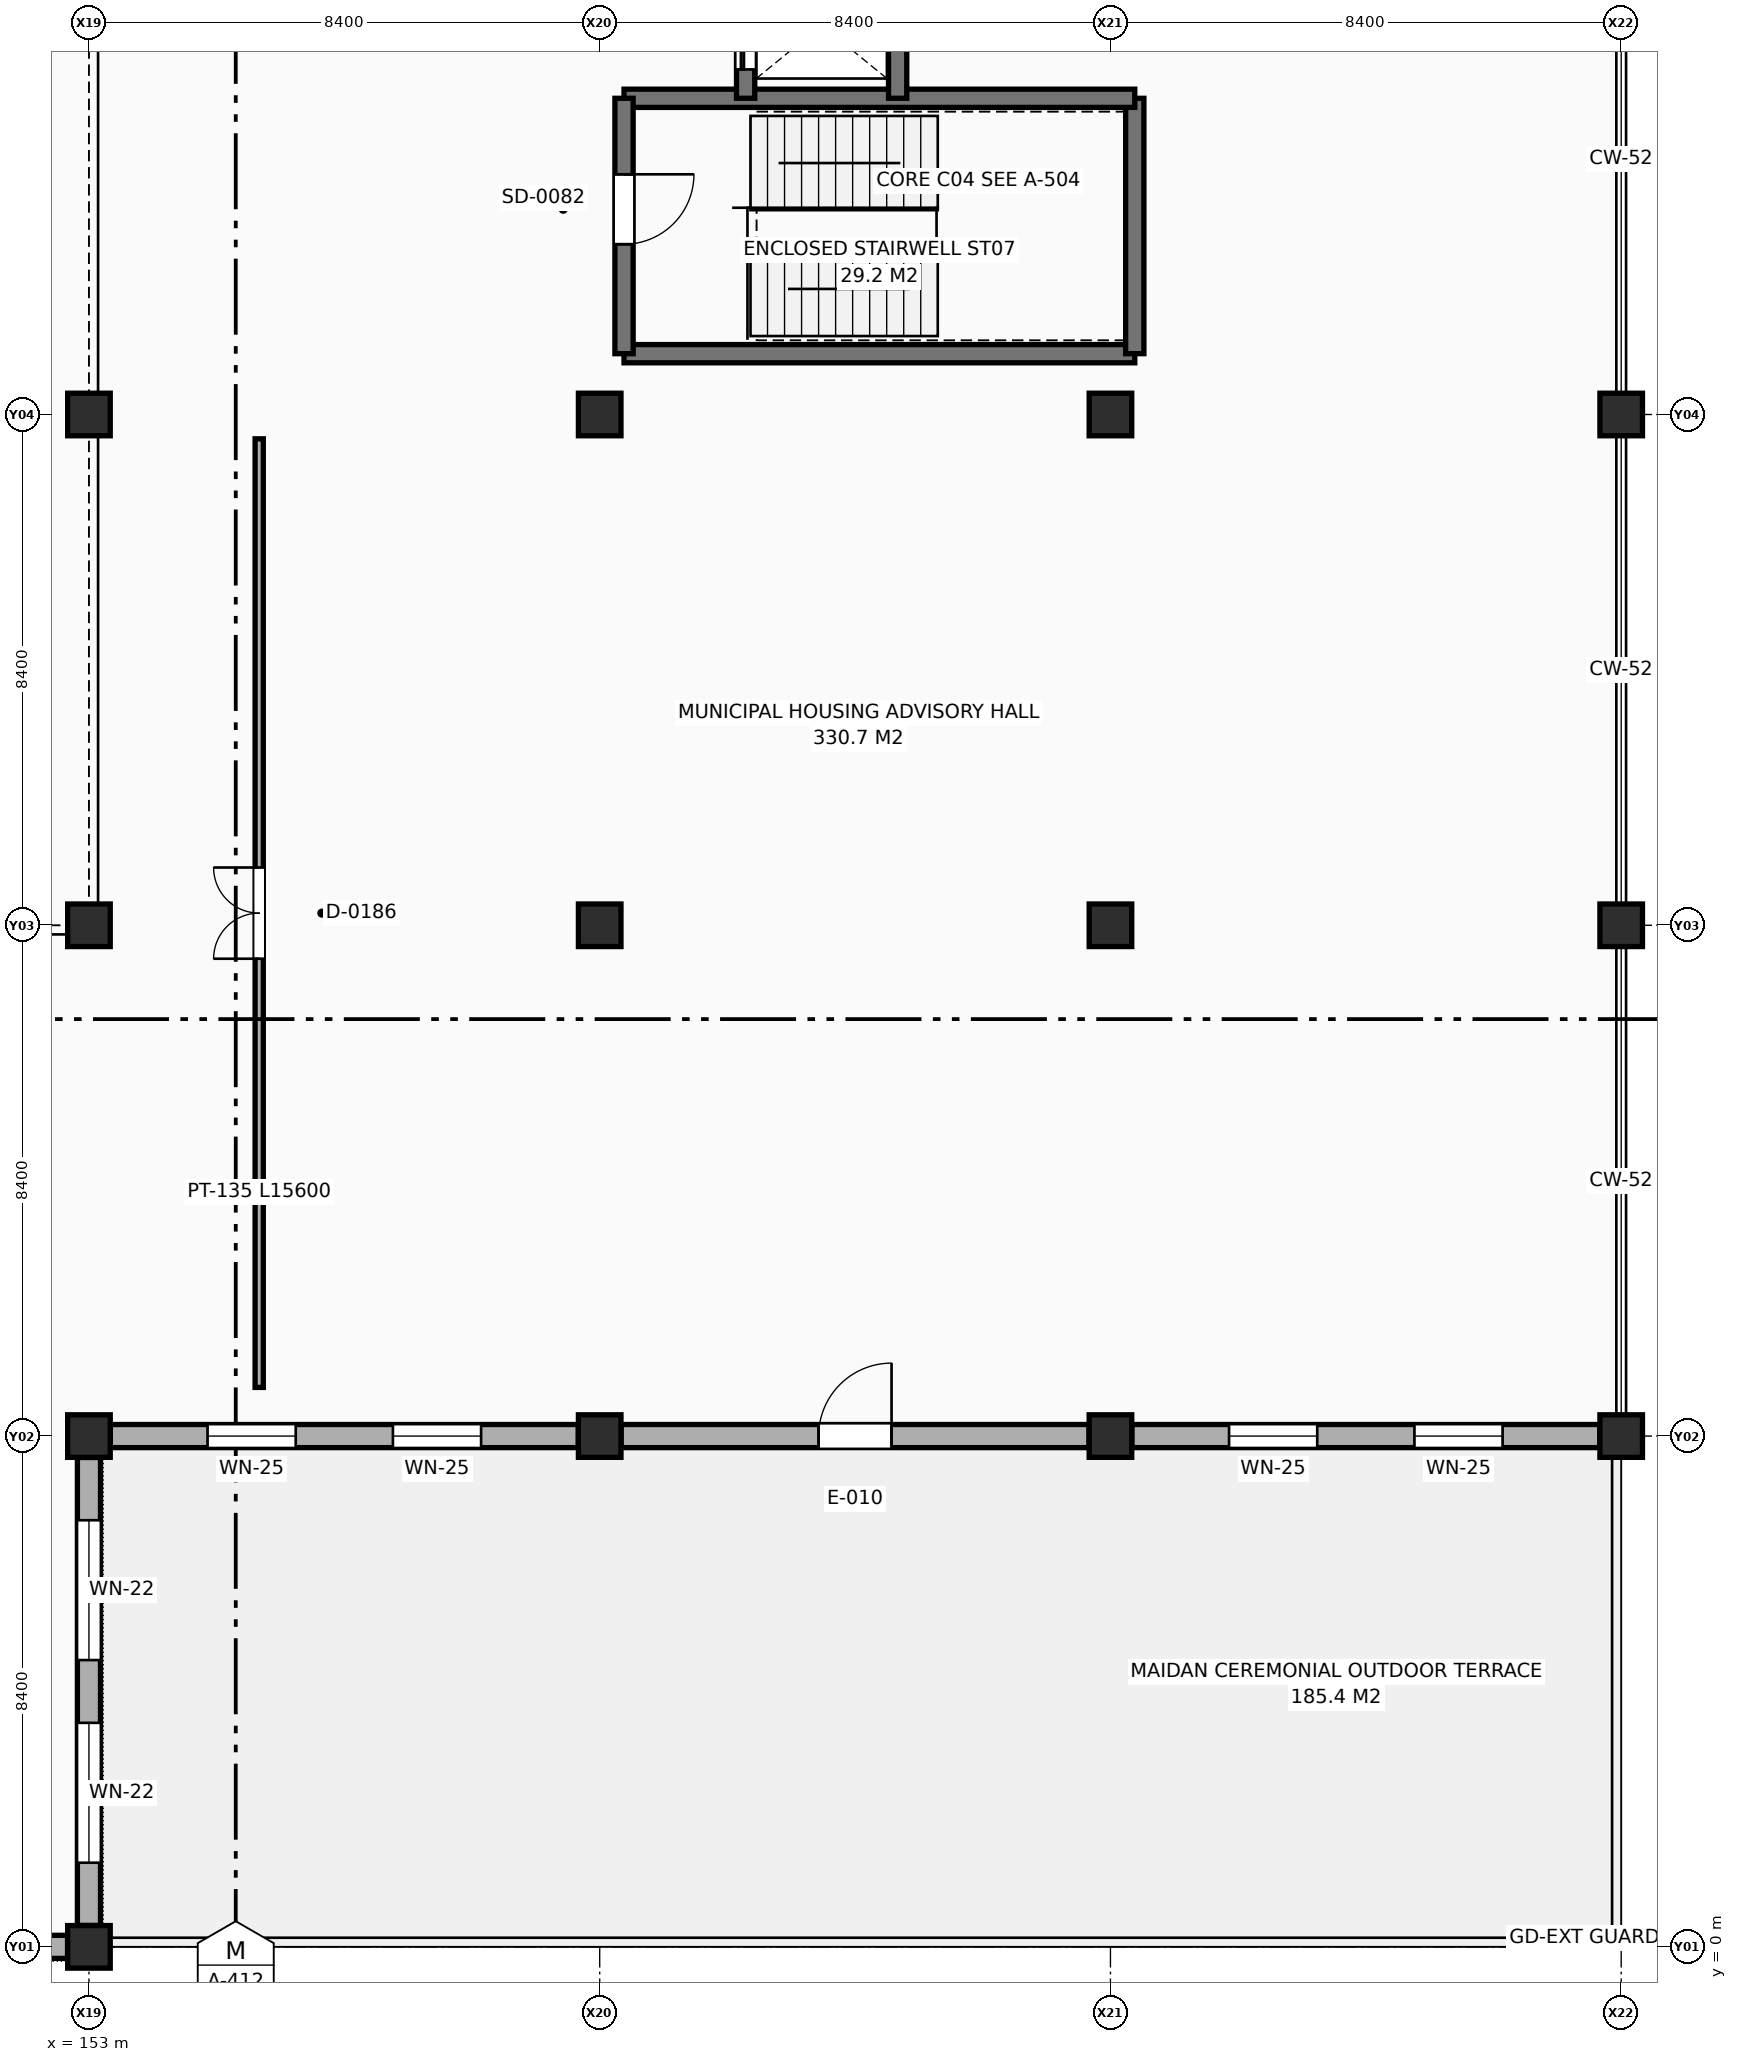
"""IFC4 building model, lengths in metres.
Left out: names, types, materials, properties, quantities, classifications, styles, units other than length and angle.
Written with IfcOpenShell. Run it as: python <this file> out.ifc"""

import sys

from ifc_helpers import new_model, si_unit, direction, frame, frame_2d, origin, origin_2d, place, context, subcontext, project, spatial, rectangle, extrude, element, fill, save


model = new_model("IFC4")
c1 = context("Model", 3, precision=1e-05, world=origin(), true_north=direction((0.0, 1.0)))
c2 = subcontext(c1, "Body", "Model", "MODEL_VIEW")
j1 = project(units=[si_unit("LENGTHUNIT", "METRE"), si_unit("PLANEANGLEUNIT", "RADIAN")], contexts=[c1])
p1 = place(None, origin())
s1 = spatial("IfcSite", under=j1, at=p1, CompositionType="ELEMENT")
p2 = place(p1, origin())
s2 = spatial("IfcBuilding", under=s1, at=p2, CompositionType="ELEMENT")
p3 = place(p2, frame((0.0, 0.0, 5.4)))
s3 = spatial("IfcBuildingStorey", under=s2, at=p3, CompositionType="ELEMENT", Elevation=5.4)
for number, where, z_axis, x_axis in (
    (1, (153.0, 0.0, 0.0), (0.0, 0.0, 1.0), (1.0, 0.0, 0.0)),
    (2, (153.0, 8.4, 0.0), (0.0, 0.0, 1.0), (1.0, 0.0, 0.0)),
    (3, (153.0, 16.8, 0.0), (0.0, 0.0, 1.0), (1.0, 0.0, 0.0)),
    (4, (153.0, 25.2, 0.0), (0.0, 0.0, 1.0), (1.0, 0.0, 0.0)),
    (5, (161.4, 8.4, 0.0), (0.0, 0.0, 1.0), (1.0, 0.0, 0.0)),
    (6, (161.4, 16.8, 0.0), (0.0, 0.0, 1.0), (1.0, 0.0, 0.0)),
    (7, (161.4, 25.2, 0.0), (0.0, 0.0, 1.0), (1.0, 0.0, 0.0)),
    (8, (169.8, 8.4, 0.0), (0.0, 0.0, 1.0), (1.0, 0.0, 0.0)),
    (9, (169.8, 16.8, 0.0), (0.0, 0.0, 1.0), (1.0, 0.0, 0.0)),
    (10, (169.8, 25.2, 0.0), (0.0, 0.0, 1.0), (1.0, 0.0, 0.0)),
    (11, (178.2, 8.4, 0.0), (0.0, 0.0, 1.0), (1.0, 0.0, 0.0)),
    (12, (178.2, 16.8, 0.0), (0.0, 0.0, 1.0), (1.0, 0.0, 0.0)),
    (13, (178.2, 25.2, 0.0), (0.0, 0.0, 1.0), (1.0, 0.0, 0.0)),
):
    element("IfcColumn", number, at=place(p3, frame(where, z_axis=z_axis, x_axis=x_axis)), inside=s3, PredefinedType="COLUMN", context=c2, shape_type="SweptSolid", body=[
        extrude(rectangle(XDim=0.7, YDim=0.7, at=origin_2d()), origin(), (0.0, 0.0, 1.0), 4.2),
    ])
p4 = place(p3, frame((144.952, 0.0, 0.0), z_axis=(0.0, 0.0, 1.0), x_axis=(1.0, 0.0, 0.0)))
e14 = element("IfcWall", 14, at=p4, inside=s3, PredefinedType="SOLIDWALL", context=c2, shape_type="SweptSolid", body=[
    extrude(rectangle(XDim=7.696, YDim=0.38, at=frame_2d((3.848, 0.0))), origin(), (0.0, 0.0, 1.0), 3.25),
])
p5 = place(p4, frame((1.232, 0.0, 0.9)))
e15 = element("IfcOpeningElement", 15, at=p5, cuts=e14, PredefinedType="OPENING", context=c2, shape_type="SweptSolid", body=[
    extrude(rectangle(XDim=2.0, YDim=1.8, at=frame_2d((1.0, 0.9))), frame((0.0, 0.2, 0.0), z_axis=(0.0, -1.0, 0.0), x_axis=(1.0, 0.0, 0.0)), (0.0, 0.0, 1.0), 0.4),
])
p6 = place(p4, frame((4.464, 0.0, 0.9)))
e16 = element("IfcOpeningElement", 16, at=p6, cuts=e14, PredefinedType="OPENING", context=c2, shape_type="SweptSolid", body=[
    extrude(rectangle(XDim=2.0, YDim=1.8, at=frame_2d((1.0, 0.9))), frame((0.0, 0.2, 0.0), z_axis=(0.0, -1.0, 0.0), x_axis=(1.0, 0.0, 0.0)), (0.0, 0.0, 1.0), 0.4),
])
p7 = place(p3, frame((153.0, 0.352, 0.0), z_axis=(0.0, 0.0, 1.0), x_axis=(0.0, 1.0, 0.0)))
e17 = element("IfcWall", 17, at=p7, inside=s3, PredefinedType="SOLIDWALL", context=c2, shape_type="SweptSolid", body=[
    extrude(rectangle(XDim=7.696, YDim=0.38, at=frame_2d((3.848, 0.0))), origin(), (0.0, 0.0, 1.0), 3.15),
])
p8 = place(p7, frame((1.032, 0.0, 0.9)))
e18 = element("IfcOpeningElement", 18, at=p8, cuts=e17, PredefinedType="OPENING", context=c2, shape_type="SweptSolid", body=[
    extrude(rectangle(XDim=2.3, YDim=1.8, at=frame_2d((1.15, 0.9))), frame((0.0, 0.2, 0.0), z_axis=(0.0, -1.0, 0.0), x_axis=(1.0, 0.0, 0.0)), (0.0, 0.0, 1.0), 0.4),
])
p9 = place(p7, frame((4.364, 0.0, 0.9)))
e19 = element("IfcOpeningElement", 19, at=p9, cuts=e17, PredefinedType="OPENING", context=c2, shape_type="SweptSolid", body=[
    extrude(rectangle(XDim=2.3, YDim=1.8, at=frame_2d((1.15, 0.9))), frame((0.0, 0.2, 0.0), z_axis=(0.0, -1.0, 0.0), x_axis=(1.0, 0.0, 0.0)), (0.0, 0.0, 1.0), 0.4),
])
p10 = place(p3, frame((153.352, 8.4, 0.0), z_axis=(0.0, 0.0, 1.0), x_axis=(1.0, 0.0, 0.0)))
e20 = element("IfcWall", 20, at=p10, inside=s3, PredefinedType="SOLIDWALL", context=c2, shape_type="SweptSolid", body=[
    extrude(rectangle(XDim=7.696, YDim=0.38, at=frame_2d((3.848, 0.0))), origin(), (0.0, 0.0, 1.0), 2.95),
])
p11 = place(p10, frame((1.599, 0.0, 0.9)))
e21 = element("IfcOpeningElement", 21, at=p11, cuts=e20, PredefinedType="OPENING", context=c2, shape_type="SweptSolid", body=[
    extrude(rectangle(XDim=1.45, YDim=1.5, at=frame_2d((0.725, 0.75))), frame((0.0, 0.2, 0.0), z_axis=(0.0, -1.0, 0.0), x_axis=(1.0, 0.0, 0.0)), (0.0, 0.0, 1.0), 0.4),
])
p12 = place(p10, frame((4.647, 0.0, 0.9)))
e22 = element("IfcOpeningElement", 22, at=p12, cuts=e20, PredefinedType="OPENING", context=c2, shape_type="SweptSolid", body=[
    extrude(rectangle(XDim=1.45, YDim=1.5, at=frame_2d((0.725, 0.75))), frame((0.0, 0.2, 0.0), z_axis=(0.0, -1.0, 0.0), x_axis=(1.0, 0.0, 0.0)), (0.0, 0.0, 1.0), 0.4),
])
p13 = place(p3, frame((161.752, 8.4, 0.0), z_axis=(0.0, 0.0, 1.0), x_axis=(1.0, 0.0, 0.0)))
e23 = element("IfcWall", 23, at=p13, inside=s3, PredefinedType="SOLIDWALL", context=c2, shape_type="SweptSolid", body=[
    extrude(rectangle(XDim=7.696, YDim=0.38, at=frame_2d((3.848, 0.0))), origin(), (0.0, 0.0, 1.0), 2.95),
])
p14 = place(p13, frame((3.248, 0.0, 0.0)))
e24 = element("IfcOpeningElement", 24, at=p14, cuts=e23, PredefinedType="OPENING", context=c2, shape_type="SweptSolid", body=[
    extrude(rectangle(XDim=1.2, YDim=2.2, at=frame_2d((0.6, 1.1))), frame((0.0, 0.2, 0.0), z_axis=(0.0, -1.0, 0.0), x_axis=(1.0, 0.0, 0.0)), (0.0, 0.0, 1.0), 0.4),
])
p15 = place(p3, frame((170.152, 8.4, 0.0), z_axis=(0.0, 0.0, 1.0), x_axis=(1.0, 0.0, 0.0)))
e25 = element("IfcWall", 25, at=p15, inside=s3, PredefinedType="SOLIDWALL", context=c2, shape_type="SweptSolid", body=[
    extrude(rectangle(XDim=7.696, YDim=0.38, at=frame_2d((3.848, 0.0))), origin(), (0.0, 0.0, 1.0), 2.95),
])
p16 = place(p15, frame((1.599, 0.0, 0.9)))
e26 = element("IfcOpeningElement", 26, at=p16, cuts=e25, PredefinedType="OPENING", context=c2, shape_type="SweptSolid", body=[
    extrude(rectangle(XDim=1.45, YDim=1.5, at=frame_2d((0.725, 0.75))), frame((0.0, 0.2, 0.0), z_axis=(0.0, -1.0, 0.0), x_axis=(1.0, 0.0, 0.0)), (0.0, 0.0, 1.0), 0.4),
])
p17 = place(p15, frame((4.647, 0.0, 0.9)))
e27 = element("IfcOpeningElement", 27, at=p17, cuts=e25, PredefinedType="OPENING", context=c2, shape_type="SweptSolid", body=[
    extrude(rectangle(XDim=1.45, YDim=1.5, at=frame_2d((0.725, 0.75))), frame((0.0, 0.2, 0.0), z_axis=(0.0, -1.0, 0.0), x_axis=(1.0, 0.0, 0.0)), (0.0, 0.0, 1.0), 0.4),
])
p18 = place(p3, frame((161.8, 26.2, 0.0), z_axis=(0.0, 0.0, 1.0), x_axis=(1.0, 0.0, 0.0)))
e28 = element("IfcWall", 28, at=p18, inside=s3, PredefinedType="SHEAR", context=c2, shape_type="SweptSolid", body=[
    extrude(rectangle(XDim=8.4, YDim=0.3, at=frame_2d((4.2, 0.0))), origin(), (0.0, 0.0, 1.0), 3.92),
])
p19 = place(p3, frame((170.2, 26.2, 0.0), z_axis=(0.0, 0.0, 1.0), x_axis=(0.0, 1.0, 0.0)))
e29 = element("IfcWall", 29, at=p19, inside=s3, PredefinedType="SHEAR", context=c2, shape_type="SweptSolid", body=[
    extrude(rectangle(XDim=4.2, YDim=0.3, at=frame_2d((2.1, 0.0))), origin(), (0.0, 0.0, 1.0), 3.92),
])
p20 = place(p3, frame((170.2, 30.4, 0.0), z_axis=(0.0, 0.0, 1.0), x_axis=(-1.0, 0.0, 0.0)))
e30 = element("IfcWall", 30, at=p20, inside=s3, PredefinedType="SHEAR", context=c2, shape_type="SweptSolid", body=[
    extrude(rectangle(XDim=8.4, YDim=0.3, at=frame_2d((4.2, 0.0))), origin(), (0.0, 0.0, 1.0), 3.92),
])
p21 = place(p3, frame((161.8, 30.4, 0.0), z_axis=(0.0, 0.0, 1.0), x_axis=(0.0, -1.0, 0.0)))
e31 = element("IfcWall", 31, at=p21, inside=s3, PredefinedType="SHEAR", context=c2, shape_type="SweptSolid", body=[
    extrude(rectangle(XDim=4.2, YDim=0.3, at=frame_2d((2.1, 0.0))), origin(), (0.0, 0.0, 1.0), 3.92),
])
p22 = place(p21, frame((1.25, 0.0, 0.0)))
e32 = element("IfcOpeningElement", 32, at=p22, cuts=e31, PredefinedType="OPENING", context=c2, shape_type="SweptSolid", body=[
    extrude(rectangle(XDim=1.15, YDim=2.2, at=frame_2d((0.575, 1.1))), frame((0.0, 0.16, 0.0), z_axis=(0.0, -1.0, 0.0), x_axis=(1.0, 0.0, 0.0)), (0.0, 0.0, 1.0), 0.32),
])
p23 = place(p3, frame((163.8, 32.8, 0.0), z_axis=(0.0, 0.0, 1.0), x_axis=(0.0, -1.0, 0.0)))
e33 = element("IfcWall", 33, at=p23, inside=s3, PredefinedType="SHEAR", context=c2, shape_type="SweptSolid", body=[
    extrude(rectangle(XDim=2.4, YDim=0.3, at=frame_2d((1.2, 0.0))), origin(), (0.0, 0.0, 1.0), 3.92),
])
p24 = place(p23, frame((0.475, 0.0, 0.0)))
e34 = element("IfcOpeningElement", 34, at=p24, cuts=e33, PredefinedType="OPENING", context=c2, shape_type="SweptSolid", body=[
    extrude(rectangle(XDim=1.45, YDim=2.35, at=frame_2d((0.725, 1.175))), frame((0.0, 0.16, 0.0), z_axis=(0.0, -1.0, 0.0), x_axis=(1.0, 0.0, 0.0)), (0.0, 0.0, 1.0), 0.32),
])
p25 = place(p3, frame((166.3, 30.4, 0.0), z_axis=(0.0, 0.0, 1.0), x_axis=(0.0, 1.0, 0.0)))
e35 = element("IfcWall", 35, at=p25, inside=s3, PredefinedType="SHEAR", context=c2, shape_type="SweptSolid", body=[
    extrude(rectangle(XDim=2.4, YDim=0.3, at=frame_2d((1.2, 0.0))), origin(), (0.0, 0.0, 1.0), 3.92),
])
p26 = place(p3, frame((155.8, 9.2, 0.0), z_axis=(0.0, 0.0, 1.0), x_axis=(0.0, 1.0, 0.0)))
e36 = element("IfcWall", 36, at=p26, inside=s3, PredefinedType="PARTITIONING", context=c2, shape_type="SweptSolid", body=[
    extrude(rectangle(XDim=15.6, YDim=0.135, at=frame_2d((7.8, 0.0))), origin(), (0.0, 0.0, 1.0), 3.86),
])
p27 = place(p26, frame((7.05, 0.0, 0.0)))
e37 = element("IfcOpeningElement", 37, at=p27, cuts=e36, PredefinedType="OPENING", context=c2, shape_type="SweptSolid", body=[
    extrude(rectangle(XDim=1.5, YDim=2.35, at=frame_2d((0.75, 1.175))), frame((0.0, 0.077, 0.0), z_axis=(0.0, -1.0, 0.0), x_axis=(1.0, 0.0, 0.0)), (0.0, 0.0, 1.0), 0.155),
])
p28 = place(p8, origin())
e38 = element("IfcWindow", 38, at=p28, inside=s3, PartitioningType="SINGLE_PANEL", PredefinedType="WINDOW", context=c2, shape_type="SweptSolid", body=[
    extrude(rectangle(XDim=2.3, YDim=1.8, at=frame_2d((1.15, 0.9))), frame((0.0, 0.03, 0.0), z_axis=(0.0, -1.0, 0.0), x_axis=(1.0, 0.0, 0.0)), (0.0, 0.0, 1.0), 0.06),
])
fill(e18, e38)
p29 = place(p9, origin())
e39 = element("IfcWindow", 39, at=p29, inside=s3, PartitioningType="SINGLE_PANEL", PredefinedType="WINDOW", context=c2, shape_type="SweptSolid", body=[
    extrude(rectangle(XDim=2.3, YDim=1.8, at=frame_2d((1.15, 0.9))), frame((0.0, 0.03, 0.0), z_axis=(0.0, -1.0, 0.0), x_axis=(1.0, 0.0, 0.0)), (0.0, 0.0, 1.0), 0.06),
])
fill(e19, e39)
p30 = place(p11, origin())
e40 = element("IfcWindow", 40, at=p30, inside=s3, PartitioningType="SINGLE_PANEL", PredefinedType="WINDOW", context=c2, shape_type="SweptSolid", body=[
    extrude(rectangle(XDim=1.45, YDim=1.5, at=frame_2d((0.725, 0.75))), frame((0.0, 0.03, 0.0), z_axis=(0.0, -1.0, 0.0), x_axis=(1.0, 0.0, 0.0)), (0.0, 0.0, 1.0), 0.06),
])
fill(e21, e40)
p31 = place(p12, origin())
e41 = element("IfcWindow", 41, at=p31, inside=s3, PartitioningType="SINGLE_PANEL", PredefinedType="WINDOW", context=c2, shape_type="SweptSolid", body=[
    extrude(rectangle(XDim=1.45, YDim=1.5, at=frame_2d((0.725, 0.75))), frame((0.0, 0.03, 0.0), z_axis=(0.0, -1.0, 0.0), x_axis=(1.0, 0.0, 0.0)), (0.0, 0.0, 1.0), 0.06),
])
fill(e22, e41)
p32 = place(p14, frame((1.2, 0.0, 0.0), z_axis=(0.0, 0.0, 1.0), x_axis=(-1.0, 0.0, 0.0)))
e42 = element("IfcDoor", 42, at=p32, inside=s3, OperationType="SINGLE_SWING_RIGHT", PredefinedType="DOOR", context=c2, shape_type="SweptSolid", body=[
    extrude(rectangle(XDim=1.2, YDim=2.2, at=frame_2d((0.6, 1.1))), frame((0.0, 0.025, 0.0), z_axis=(0.0, -1.0, 0.0), x_axis=(1.0, 0.0, 0.0)), (0.0, 0.0, 1.0), 0.05),
])
fill(e24, e42)
p33 = place(p16, origin())
e43 = element("IfcWindow", 43, at=p33, inside=s3, PartitioningType="SINGLE_PANEL", PredefinedType="WINDOW", context=c2, shape_type="SweptSolid", body=[
    extrude(rectangle(XDim=1.45, YDim=1.5, at=frame_2d((0.725, 0.75))), frame((0.0, 0.03, 0.0), z_axis=(0.0, -1.0, 0.0), x_axis=(1.0, 0.0, 0.0)), (0.0, 0.0, 1.0), 0.06),
])
fill(e26, e43)
p34 = place(p17, origin())
e44 = element("IfcWindow", 44, at=p34, inside=s3, PartitioningType="SINGLE_PANEL", PredefinedType="WINDOW", context=c2, shape_type="SweptSolid", body=[
    extrude(rectangle(XDim=1.45, YDim=1.5, at=frame_2d((0.725, 0.75))), frame((0.0, 0.03, 0.0), z_axis=(0.0, -1.0, 0.0), x_axis=(1.0, 0.0, 0.0)), (0.0, 0.0, 1.0), 0.06),
])
fill(e27, e44)
p35 = place(p22, origin())
e45 = element("IfcDoor", 45, at=p35, inside=s3, OperationType="SINGLE_SWING_LEFT", PredefinedType="DOOR", context=c2, shape_type="SweptSolid", body=[
    extrude(rectangle(XDim=1.15, YDim=2.2, at=frame_2d((0.575, 1.1))), frame((0.0, 0.025, 0.0), z_axis=(0.0, -1.0, 0.0), x_axis=(1.0, 0.0, 0.0)), (0.0, 0.0, 1.0), 0.05),
])
fill(e32, e45)
p36 = place(p24, origin())
e46 = element("IfcDoor", 46, at=p36, inside=s3, OperationType="SLIDING_TO_LEFT", PredefinedType="DOOR", context=c2, shape_type="SweptSolid", body=[
    extrude(rectangle(XDim=1.45, YDim=2.35, at=frame_2d((0.725, 1.175))), frame((0.0, 0.025, 0.0), z_axis=(0.0, -1.0, 0.0), x_axis=(1.0, 0.0, 0.0)), (0.0, 0.0, 1.0), 0.05),
])
fill(e34, e46)
p37 = place(p27, origin())
e47 = element("IfcDoor", 47, at=p37, inside=s3, OperationType="DOUBLE_DOOR_SINGLE_SWING", PredefinedType="DOOR", context=c2, shape_type="SweptSolid", body=[
    extrude(rectangle(XDim=1.5, YDim=2.35, at=frame_2d((0.75, 1.175))), frame((0.0, 0.025, 0.0), z_axis=(0.0, -1.0, 0.0), x_axis=(1.0, 0.0, 0.0)), (0.0, 0.0, 1.0), 0.05),
])
fill(e37, e47)
save(model, sys.argv[1])
